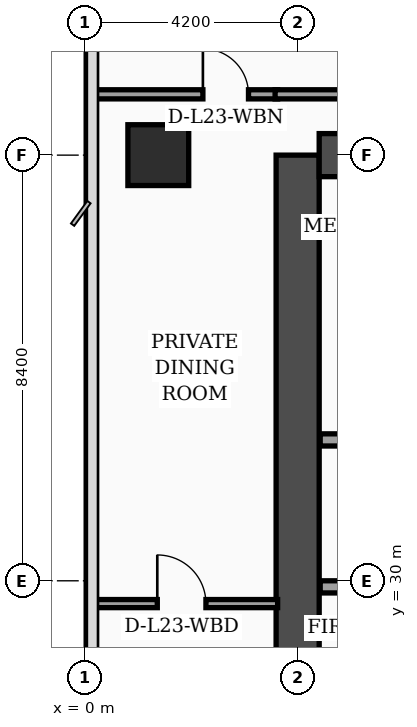
"""IFC4 building model, lengths in metres.
Left out: names, types, materials, properties, quantities, classifications, styles, units other than length and angle.
Written with IfcOpenShell. Run it as: python <this file> out.ifc"""

import sys

from ifc_helpers import new_model, si_unit, direction, frame, frame_2d, origin, origin_2d, place, context, subcontext, project, spatial, rectangle, extrude, element, fill, save


model = new_model("IFC4")
c1 = context("Model", 3, precision=1e-05, world=origin(), true_north=direction((0.0, 1.0)))
c2 = subcontext(c1, "Body", "Model", "MODEL_VIEW")
j1 = project(units=[si_unit("LENGTHUNIT", "METRE"), si_unit("PLANEANGLEUNIT", "RADIAN")], contexts=[c1])
p1 = place(None, origin())
s1 = spatial("IfcSite", under=j1, at=p1, CompositionType="ELEMENT")
p2 = place(p1, origin())
s2 = spatial("IfcBuilding", under=s1, at=p2, CompositionType="ELEMENT")
p3 = place(p2, frame((0.0, 0.0, 97.4)))
s3 = spatial("IfcBuildingStorey", under=s2, at=p3, CompositionType="ELEMENT", Elevation=97.4)
p4 = place(p3, frame((4.2, 16.8, 0.0), z_axis=(0.0, 0.0, 1.0), x_axis=(0.0, 1.0, 0.0)))
e1 = element("IfcWall", 1, at=p4, inside=s3, PredefinedType="SHEAR", context=c2, shape_type="SweptSolid", body=[
    extrude(rectangle(XDim=21.6, YDim=0.85, at=frame_2d((10.8, 0.0))), origin(), (0.0, 0.0, 1.0), 3.56),
])
p5 = place(p3, frame((4.625, 38.4, 0.0), z_axis=(0.0, 0.0, 1.0), x_axis=(1.0, 0.0, 0.0)))
e2 = element("IfcWall", 2, at=p5, inside=s3, PredefinedType="SHEAR", context=c2, shape_type="SweptSolid", body=[
    extrude(rectangle(XDim=9.95, YDim=0.85, at=frame_2d((4.975, 0.0))), origin(), (0.0, 0.0, 1.0), 3.56),
])
p6 = place(p3, frame((1.45, 38.4, 0.0), z_axis=(0.0, 0.0, 1.0), x_axis=(1.0, 0.0, 0.0)))
e3 = element("IfcColumn", 3, at=p6, inside=s3, PredefinedType="COLUMN", context=c2, shape_type="SweptSolid", body=[
    extrude(rectangle(XDim=1.2, YDim=1.2, at=origin_2d()), origin(), (0.0, 0.0, 1.0), 3.56),
])
p7 = place(p3, frame((4.645, 29.88, 0.0), z_axis=(0.0, 0.0, 1.0), x_axis=(1.0, 0.0, 0.0)))
e4 = element("IfcWall", 4, at=p7, inside=s3, PredefinedType="SOLIDWALL", context=c2, shape_type="SweptSolid", body=[
    extrude(rectangle(XDim=4.775, YDim=0.24, at=frame_2d((2.387, 0.0))), origin(), (0.0, 0.0, 1.0), 3.56),
])
p8 = place(p7, frame((0.45, 0.0, 0.0)))
e5 = element("IfcOpeningElement", 5, at=p8, cuts=e4, PredefinedType="OPENING", context=c2, shape_type="SweptSolid", body=[
    extrude(rectangle(XDim=1.3, YDim=2.35, at=frame_2d((0.65, 1.175))), frame((0.0, 0.13, 0.0), z_axis=(0.0, -1.0, 0.0), x_axis=(1.0, 0.0, 0.0)), (0.0, 0.0, 1.0), 0.26),
])
p9 = place(p3, frame((4.645, 32.78, 0.0), z_axis=(0.0, 0.0, 1.0), x_axis=(1.0, 0.0, 0.0)))
e6 = element("IfcWall", 6, at=p9, inside=s3, PredefinedType="SOLIDWALL", context=c2, shape_type="SweptSolid", body=[
    extrude(rectangle(XDim=4.775, YDim=0.24, at=frame_2d((2.387, 0.0))), origin(), (0.0, 0.0, 1.0), 3.19),
])
p10 = place(p3, frame((0.08, 29.55, 0.0), z_axis=(0.0, 0.0, 1.0), x_axis=(1.0, 0.0, 0.0)))
e7 = element("IfcWall", 7, at=p10, inside=s3, PredefinedType="PARTITIONING", context=c2, shape_type="SweptSolid", body=[
    extrude(rectangle(XDim=3.725, YDim=0.16, at=frame_2d((1.862, 0.0))), origin(), (0.0, 0.0, 1.0), 3.04),
])
p11 = place(p10, frame((1.35, 0.0, 0.0)))
e8 = element("IfcOpeningElement", 8, at=p11, cuts=e7, PredefinedType="OPENING", context=c2, shape_type="SweptSolid", body=[
    extrude(rectangle(XDim=0.96, YDim=2.2, at=frame_2d((0.48, 1.1))), frame((0.0, 0.09, 0.0), z_axis=(0.0, -1.0, 0.0), x_axis=(1.0, 0.0, 0.0)), (0.0, 0.0, 1.0), 0.18),
])
p12 = place(p3, frame((0.08, 39.6, 0.0), z_axis=(0.0, 0.0, 1.0), x_axis=(1.0, 0.0, 0.0)))
e9 = element("IfcWall", 9, at=p12, inside=s3, PredefinedType="PARTITIONING", context=c2, shape_type="SweptSolid", body=[
    extrude(rectangle(XDim=3.725, YDim=0.18, at=frame_2d((1.862, 0.0))), origin(), (0.0, 0.0, 1.0), 2.84),
])
p13 = place(p12, frame((2.25, 0.0, 0.0)))
e10 = element("IfcOpeningElement", 10, at=p13, cuts=e9, PredefinedType="OPENING", context=c2, shape_type="SweptSolid", body=[
    extrude(rectangle(XDim=0.9, YDim=2.15, at=frame_2d((0.45, 1.075))), frame((0.0, 0.1, 0.0), z_axis=(0.0, -1.0, 0.0), x_axis=(1.0, 0.0, 0.0)), (0.0, 0.0, 1.0), 0.2),
])
p14 = place(p3, frame((3.755, 39.6, 0.0), z_axis=(0.0, 0.0, 1.0), x_axis=(1.0, 0.0, 0.0)))
e11 = element("IfcWall", 11, at=p14, inside=s3, PredefinedType="PARTITIONING", context=c2, shape_type="SweptSolid", body=[
    extrude(rectangle(XDim=11.395, YDim=0.18, at=frame_2d((5.698, 0.0))), origin(), (0.0, 0.0, 1.0), 2.84),
])
p15 = place(p11, origin())
e12 = element("IfcDoor", 12, at=p15, inside=s3, OperationType="SINGLE_SWING_LEFT", PredefinedType="DOOR", context=c2, shape_type="SweptSolid", body=[
    extrude(rectangle(XDim=0.96, YDim=2.2, at=frame_2d((0.48, 1.1))), frame((0.0, 0.025, 0.0), z_axis=(0.0, -1.0, 0.0), x_axis=(1.0, 0.0, 0.0)), (0.0, 0.0, 1.0), 0.05),
])
fill(e8, e12)
p16 = place(p13, origin())
e13 = element("IfcDoor", 13, at=p16, inside=s3, OperationType="SINGLE_SWING_LEFT", PredefinedType="DOOR", context=c2, shape_type="SweptSolid", body=[
    extrude(rectangle(XDim=0.9, YDim=2.15, at=frame_2d((0.45, 1.075))), frame((0.0, 0.025, 0.0), z_axis=(0.0, -1.0, 0.0), x_axis=(1.0, 0.0, 0.0)), (0.0, 0.0, 1.0), 0.05),
])
fill(e10, e13)
save(model, sys.argv[1])
